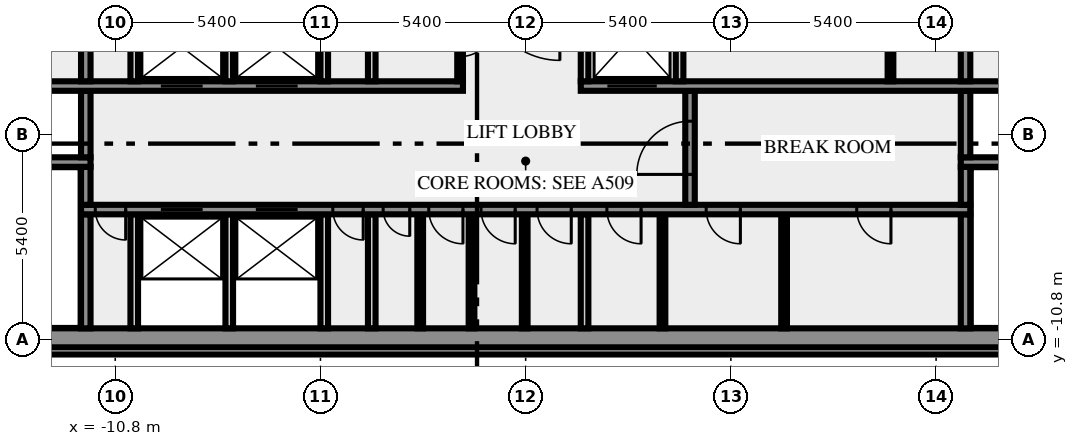
"""IFC4 building model, lengths in metres.
Left out: names, types, materials, properties, quantities, classifications, styles, units other than length and angle.
Written with IfcOpenShell. Run it as: python <this file> out.ifc"""

import sys

from ifc_helpers import new_model, si_unit, direction, frame, frame_2d, origin, place, context, subcontext, project, spatial, rectangle, extrude, element, fill, save


model = new_model("IFC4")
c1 = context("Model", 3, precision=1e-05, world=origin(), true_north=direction((0.0, 1.0)))
c2 = subcontext(c1, "Body", "Model", "MODEL_VIEW")
j1 = project(units=[si_unit("LENGTHUNIT", "METRE"), si_unit("PLANEANGLEUNIT", "RADIAN")], contexts=[c1])
p1 = place(None, origin())
s1 = spatial("IfcSite", under=j1, at=p1, CompositionType="ELEMENT")
p2 = place(p1, origin())
s2 = spatial("IfcBuilding", under=s1, at=p2, CompositionType="ELEMENT")
p3 = place(p2, frame((0.0, 0.0, 269.0)))
s3 = spatial("IfcBuildingStorey", under=s2, at=p3, CompositionType="ELEMENT", Elevation=269.0)
p4 = place(p3, frame((-17.444, -11.088, 0.0), z_axis=(0.0, 0.0, 1.0), x_axis=(1.0, 0.0, 0.0)))
e1 = element("IfcWall", 1, at=p4, inside=s3, PredefinedType="SOLIDWALL", context=c2, shape_type="SweptSolid", body=[
    extrude(rectangle(XDim=34.888, YDim=0.2, at=frame_2d((17.444, 0.0))), origin(), (0.0, 0.0, 1.0), 3.5),
])
p5 = place(p3, frame((-20.0, -10.75, 0.0), z_axis=(0.0, 0.0, 1.0), x_axis=(1.0, 0.0, 0.0)))
e2 = element("IfcWall", 2, at=p5, inside=s3, PredefinedType="SHEAR", context=c2, shape_type="SweptSolid", body=[
    extrude(rectangle(XDim=40.0, YDim=0.5, at=frame_2d((20.0, 0.0))), origin(), (0.0, 0.0, 1.0), 3.5),
])
p6 = place(p5, frame((0.8, 0.0, 1.0)))
e3 = element("IfcOpeningElement", 3, at=p6, cuts=e2, PredefinedType="OPENING", context=c2, shape_type="SweptSolid", body=[
    extrude(rectangle(XDim=1.2, YDim=1.2, at=frame_2d((0.6, 0.6))), frame((0.0, 0.26, 0.0), z_axis=(0.0, -1.0, 0.0), x_axis=(1.0, 0.0, 0.0)), (0.0, 0.0, 1.0), 0.52),
])
p7 = place(p5, frame((38.0, 0.0, 1.0)))
e4 = element("IfcOpeningElement", 4, at=p7, cuts=e2, PredefinedType="OPENING", context=c2, shape_type="SweptSolid", body=[
    extrude(rectangle(XDim=1.2, YDim=1.2, at=frame_2d((0.6, 0.6))), frame((0.0, 0.26, 0.0), z_axis=(0.0, -1.0, 0.0), x_axis=(1.0, 0.0, 0.0)), (0.0, 0.0, 1.0), 0.52),
])
p8 = place(p3, frame((-11.575, -10.5, 0.0), z_axis=(0.0, 0.0, 1.0), x_axis=(0.0, 1.0, 0.0)))
e5 = element("IfcWall", 5, at=p8, inside=s3, PredefinedType="SHEAR", context=c2, shape_type="SweptSolid", body=[
    extrude(rectangle(XDim=3.0, YDim=0.25, at=frame_2d((1.5, 0.0))), origin(), (0.0, 0.0, 1.0), 3.5),
])
for number, where, z_axis, x_axis in (
    (6, (-10.3, -10.5, 0.0), (0.0, 0.0, 1.0), (0.0, 1.0, 0.0)),
    (7, (-7.8, -10.5, 0.0), (0.0, 0.0, 1.0), (0.0, 1.0, 0.0)),
    (8, (-5.3, -10.5, 0.0), (0.0, 0.0, 1.0), (0.0, 1.0, 0.0)),
    (9, (-4.05, -10.5, 0.0), (0.0, 0.0, 1.0), (0.0, 1.0, 0.0)),
):
    element("IfcWall", number, at=place(p3, frame(where, z_axis=z_axis, x_axis=x_axis)), inside=s3, PredefinedType="SOLIDWALL", context=c2, shape_type="SweptSolid", body=[
        extrude(rectangle(XDim=3.0, YDim=0.2, at=frame_2d((1.5, 0.0))), origin(), (0.0, 0.0, 1.0), 3.5),
    ])
for number, where, z_axis, x_axis in (
    (10, (-2.775, -10.5, 0.0), (0.0, 0.0, 1.0), (0.0, 1.0, 0.0)),
    (11, (-1.425, -10.5, 0.0), (0.0, 0.0, 1.0), (0.0, 1.0, 0.0)),
    (12, (-0.025, -10.5, 0.0), (0.0, 0.0, 1.0), (0.0, 1.0, 0.0)),
):
    element("IfcWall", number, at=place(p3, frame(where, z_axis=z_axis, x_axis=x_axis)), inside=s3, PredefinedType="PARTITIONING", context=c2, shape_type="SweptSolid", body=[
        extrude(rectangle(XDim=3.0, YDim=0.15, at=frame_2d((1.5, 0.0))), origin(), (0.0, 0.0, 1.0), 3.5),
    ])
p9 = place(p3, frame((1.55, -10.5, 0.0), z_axis=(0.0, 0.0, 1.0), x_axis=(0.0, 1.0, 0.0)))
e13 = element("IfcWall", 13, at=p9, inside=s3, PredefinedType="SOLIDWALL", context=c2, shape_type="SweptSolid", body=[
    extrude(rectangle(XDim=3.0, YDim=0.2, at=frame_2d((1.5, 0.0))), origin(), (0.0, 0.0, 1.0), 3.5),
])
for number, where, z_axis, x_axis in (
    (14, (3.6, -10.5, 0.0), (0.0, 0.0, 1.0), (0.0, 1.0, 0.0)),
    (15, (6.8, -10.5, 0.0), (0.0, 0.0, 1.0), (0.0, 1.0, 0.0)),
):
    element("IfcWall", number, at=place(p3, frame(where, z_axis=z_axis, x_axis=x_axis)), inside=s3, PredefinedType="PARTITIONING", context=c2, shape_type="SweptSolid", body=[
        extrude(rectangle(XDim=3.0, YDim=0.15, at=frame_2d((1.5, 0.0))), origin(), (0.0, 0.0, 1.0), 3.5),
    ])
p10 = place(p3, frame((11.575, -10.5, 0.0), z_axis=(0.0, 0.0, 1.0), x_axis=(0.0, 1.0, 0.0)))
e16 = element("IfcWall", 16, at=p10, inside=s3, PredefinedType="SHEAR", context=c2, shape_type="SweptSolid", body=[
    extrude(rectangle(XDim=3.0, YDim=0.25, at=frame_2d((1.5, 0.0))), origin(), (0.0, 0.0, 1.0), 3.5),
])
p11 = place(p3, frame((11.7, -7.375, 0.0), z_axis=(0.0, 0.0, 1.0), x_axis=(-1.0, 0.0, 0.0)))
e17 = element("IfcWall", 17, at=p11, inside=s3, PredefinedType="SHEAR", context=c2, shape_type="SweptSolid", body=[
    extrude(rectangle(XDim=23.4, YDim=0.25, at=frame_2d((11.7, 0.0))), origin(), (0.0, 0.0, 1.0), 3.5),
])
p12 = place(p11, frame((22.225, 0.0, 0.0)))
e18 = element("IfcOpeningElement", 18, at=p12, cuts=e17, PredefinedType="OPENING", context=c2, shape_type="SweptSolid", body=[
    extrude(rectangle(XDim=0.8, YDim=2.1, at=frame_2d((0.4, 1.05))), frame((0.0, 0.135, 0.0), z_axis=(0.0, -1.0, 0.0), x_axis=(1.0, 0.0, 0.0)), (0.0, 0.0, 1.0), 0.27),
])
p13 = place(p11, frame((20.2, 0.0, 0.0)))
e19 = element("IfcOpeningElement", 19, at=p13, cuts=e17, PredefinedType="OPENING", context=c2, shape_type="SweptSolid", body=[
    extrude(rectangle(XDim=1.1, YDim=2.1, at=frame_2d((0.55, 1.05))), frame((0.0, 0.135, 0.0), z_axis=(0.0, -1.0, 0.0), x_axis=(1.0, 0.0, 0.0)), (0.0, 0.0, 1.0), 0.27),
])
p14 = place(p11, frame((17.7, 0.0, 0.0)))
e20 = element("IfcOpeningElement", 20, at=p14, cuts=e17, PredefinedType="OPENING", context=c2, shape_type="SweptSolid", body=[
    extrude(rectangle(XDim=1.1, YDim=2.1, at=frame_2d((0.55, 1.05))), frame((0.0, 0.135, 0.0), z_axis=(0.0, -1.0, 0.0), x_axis=(1.0, 0.0, 0.0)), (0.0, 0.0, 1.0), 0.27),
])
p15 = place(p11, frame((15.975, 0.0, 0.0)))
e21 = element("IfcOpeningElement", 21, at=p15, cuts=e17, PredefinedType="OPENING", context=c2, shape_type="SweptSolid", body=[
    extrude(rectangle(XDim=0.8, YDim=2.1, at=frame_2d((0.4, 1.05))), frame((0.0, 0.135, 0.0), z_axis=(0.0, -1.0, 0.0), x_axis=(1.0, 0.0, 0.0)), (0.0, 0.0, 1.0), 0.27),
])
p16 = place(p11, frame((14.75, 0.0, 0.0)))
e22 = element("IfcOpeningElement", 22, at=p16, cuts=e17, PredefinedType="OPENING", context=c2, shape_type="SweptSolid", body=[
    extrude(rectangle(XDim=0.7, YDim=2.1, at=frame_2d((0.35, 1.05))), frame((0.0, 0.135, 0.0), z_axis=(0.0, -1.0, 0.0), x_axis=(1.0, 0.0, 0.0)), (0.0, 0.0, 1.0), 0.27),
])
p17 = place(p11, frame((13.35, 0.0, 0.0)))
e23 = element("IfcOpeningElement", 23, at=p17, cuts=e17, PredefinedType="OPENING", context=c2, shape_type="SweptSolid", body=[
    extrude(rectangle(XDim=0.9, YDim=2.1, at=frame_2d((0.45, 1.05))), frame((0.0, 0.135, 0.0), z_axis=(0.0, -1.0, 0.0), x_axis=(1.0, 0.0, 0.0)), (0.0, 0.0, 1.0), 0.27),
])
p18 = place(p11, frame((11.975, 0.0, 0.0)))
e24 = element("IfcOpeningElement", 24, at=p18, cuts=e17, PredefinedType="OPENING", context=c2, shape_type="SweptSolid", body=[
    extrude(rectangle(XDim=0.9, YDim=2.1, at=frame_2d((0.45, 1.05))), frame((0.0, 0.135, 0.0), z_axis=(0.0, -1.0, 0.0), x_axis=(1.0, 0.0, 0.0)), (0.0, 0.0, 1.0), 0.27),
])
p19 = place(p11, frame((10.5, 0.0, 0.0)))
e25 = element("IfcOpeningElement", 25, at=p19, cuts=e17, PredefinedType="OPENING", context=c2, shape_type="SweptSolid", body=[
    extrude(rectangle(XDim=0.9, YDim=2.1, at=frame_2d((0.45, 1.05))), frame((0.0, 0.135, 0.0), z_axis=(0.0, -1.0, 0.0), x_axis=(1.0, 0.0, 0.0)), (0.0, 0.0, 1.0), 0.27),
])
p20 = place(p11, frame((8.663, 0.0, 0.0)))
e26 = element("IfcOpeningElement", 26, at=p20, cuts=e17, PredefinedType="OPENING", context=c2, shape_type="SweptSolid", body=[
    extrude(rectangle(XDim=0.9, YDim=2.1, at=frame_2d((0.45, 1.05))), frame((0.0, 0.135, 0.0), z_axis=(0.0, -1.0, 0.0), x_axis=(1.0, 0.0, 0.0)), (0.0, 0.0, 1.0), 0.27),
])
p21 = place(p11, frame((6.05, 0.0, 0.0)))
e27 = element("IfcOpeningElement", 27, at=p21, cuts=e17, PredefinedType="OPENING", context=c2, shape_type="SweptSolid", body=[
    extrude(rectangle(XDim=0.9, YDim=2.1, at=frame_2d((0.45, 1.05))), frame((0.0, 0.135, 0.0), z_axis=(0.0, -1.0, 0.0), x_axis=(1.0, 0.0, 0.0)), (0.0, 0.0, 1.0), 0.27),
])
p22 = place(p11, frame((2.088, 0.0, 0.0)))
e28 = element("IfcOpeningElement", 28, at=p22, cuts=e17, PredefinedType="OPENING", context=c2, shape_type="SweptSolid", body=[
    extrude(rectangle(XDim=0.9, YDim=2.1, at=frame_2d((0.45, 1.05))), frame((0.0, 0.135, 0.0), z_axis=(0.0, -1.0, 0.0), x_axis=(1.0, 0.0, 0.0)), (0.0, 0.0, 1.0), 0.27),
])
p23 = place(p3, frame((-11.575, -7.25, 0.0), z_axis=(0.0, 0.0, 1.0), x_axis=(0.0, 1.0, 0.0)))
e29 = element("IfcWall", 29, at=p23, inside=s3, PredefinedType="SHEAR", context=c2, shape_type="SweptSolid", body=[
    extrude(rectangle(XDim=1.0, YDim=0.25, at=frame_2d((0.5, 0.0))), origin(), (0.0, 0.0, 1.0), 3.5),
])
p24 = place(p3, frame((4.325, -7.25, 0.0), z_axis=(0.0, 0.0, 1.0), x_axis=(0.0, 1.0, 0.0)))
e30 = element("IfcWall", 30, at=p24, inside=s3, PredefinedType="SHEAR", context=c2, shape_type="SweptSolid", body=[
    extrude(rectangle(XDim=3.0, YDim=0.25, at=frame_2d((1.5, 0.0))), origin(), (0.0, 0.0, 1.0), 3.5),
])
p25 = place(p24, frame((0.8, 0.0, 0.0)))
e31 = element("IfcOpeningElement", 31, at=p25, cuts=e30, PredefinedType="OPENING", context=c2, shape_type="SweptSolid", body=[
    extrude(rectangle(XDim=1.4, YDim=2.1, at=frame_2d((0.7, 1.05))), frame((0.0, 0.135, 0.0), z_axis=(0.0, -1.0, 0.0), x_axis=(1.0, 0.0, 0.0)), (0.0, 0.0, 1.0), 0.27),
])
p26 = place(p3, frame((11.575, -7.25, 0.0), z_axis=(0.0, 0.0, 1.0), x_axis=(0.0, 1.0, 0.0)))
e32 = element("IfcWall", 32, at=p26, inside=s3, PredefinedType="SHEAR", context=c2, shape_type="SweptSolid", body=[
    extrude(rectangle(XDim=1.0, YDim=0.25, at=frame_2d((0.5, 0.0))), origin(), (0.0, 0.0, 1.0), 3.5),
])
p27 = place(p3, frame((-11.45, -6.125, 0.0), z_axis=(0.0, 0.0, 1.0), x_axis=(-1.0, 0.0, 0.0)))
e33 = element("IfcWall", 33, at=p27, inside=s3, PredefinedType="SHEAR", context=c2, shape_type="SweptSolid", body=[
    extrude(rectangle(XDim=8.05, YDim=0.25, at=frame_2d((4.025, 0.0))), origin(), (0.0, 0.0, 1.0), 3.5),
])
p28 = place(p27, frame((6.2, 0.0, 0.0)))
e34 = element("IfcOpeningElement", 34, at=p28, cuts=e33, PredefinedType="OPENING", context=c2, shape_type="SweptSolid", body=[
    extrude(rectangle(XDim=1.8, YDim=2.1, at=frame_2d((0.9, 1.05))), frame((0.0, 0.135, 0.0), z_axis=(0.0, -1.0, 0.0), x_axis=(1.0, 0.0, 0.0)), (0.0, 0.0, 1.0), 0.27),
])
p29 = place(p3, frame((19.5, -6.125, 0.0), z_axis=(0.0, 0.0, 1.0), x_axis=(-1.0, 0.0, 0.0)))
e35 = element("IfcWall", 35, at=p29, inside=s3, PredefinedType="SHEAR", context=c2, shape_type="SweptSolid", body=[
    extrude(rectangle(XDim=8.05, YDim=0.25, at=frame_2d((4.025, 0.0))), origin(), (0.0, 0.0, 1.0), 3.5),
])
p30 = place(p29, frame((0.05, 0.0, 0.0)))
e36 = element("IfcOpeningElement", 36, at=p30, cuts=e35, PredefinedType="OPENING", context=c2, shape_type="SweptSolid", body=[
    extrude(rectangle(XDim=1.8, YDim=2.1, at=frame_2d((0.9, 1.05))), frame((0.0, 0.135, 0.0), z_axis=(0.0, -1.0, 0.0), x_axis=(1.0, 0.0, 0.0)), (0.0, 0.0, 1.0), 0.27),
])
for number, where, z_axis, x_axis in (
    (37, (-11.575, -6.0, 0.0), (0.0, 0.0, 1.0), (0.0, 1.0, 0.0)),
    (38, (11.575, -6.0, 0.0), (0.0, 0.0, 1.0), (0.0, 1.0, 0.0)),
):
    element("IfcWall", number, at=place(p3, frame(where, z_axis=z_axis, x_axis=x_axis)), inside=s3, PredefinedType="SHEAR", context=c2, shape_type="SweptSolid", body=[
        extrude(rectangle(XDim=1.75, YDim=0.25, at=frame_2d((0.875, 0.0))), origin(), (0.0, 0.0, 1.0), 3.5),
    ])
p31 = place(p3, frame((-14.35, -4.125, 0.0), z_axis=(0.0, 0.0, 1.0), x_axis=(1.0, 0.0, 0.0)))
e39 = element("IfcWall", 39, at=p31, inside=s3, PredefinedType="SHEAR", context=c2, shape_type="SweptSolid", body=[
    extrude(rectangle(XDim=12.7, YDim=0.25, at=frame_2d((6.35, 0.0))), origin(), (0.0, 0.0, 1.0), 3.5),
])
p32 = place(p31, frame((4.75, 0.0, 0.0)))
e40 = element("IfcOpeningElement", 40, at=p32, cuts=e39, PredefinedType="OPENING", context=c2, shape_type="SweptSolid", body=[
    extrude(rectangle(XDim=1.1, YDim=2.1, at=frame_2d((0.55, 1.05))), frame((0.0, 0.135, 0.0), z_axis=(0.0, -1.0, 0.0), x_axis=(1.0, 0.0, 0.0)), (0.0, 0.0, 1.0), 0.27),
])
p33 = place(p31, frame((7.25, 0.0, 0.0)))
e41 = element("IfcOpeningElement", 41, at=p33, cuts=e39, PredefinedType="OPENING", context=c2, shape_type="SweptSolid", body=[
    extrude(rectangle(XDim=1.1, YDim=2.1, at=frame_2d((0.55, 1.05))), frame((0.0, 0.135, 0.0), z_axis=(0.0, -1.0, 0.0), x_axis=(1.0, 0.0, 0.0)), (0.0, 0.0, 1.0), 0.27),
])
p34 = place(p3, frame((1.45, -4.125, 0.0), z_axis=(0.0, 0.0, 1.0), x_axis=(1.0, 0.0, 0.0)))
e42 = element("IfcWall", 42, at=p34, inside=s3, PredefinedType="SHEAR", context=c2, shape_type="SweptSolid", body=[
    extrude(rectangle(XDim=12.9, YDim=0.25, at=frame_2d((6.45, 0.0))), origin(), (0.0, 0.0, 1.0), 3.5),
])
p35 = place(p34, frame((0.7, 0.0, 0.0)))
e43 = element("IfcOpeningElement", 43, at=p35, cuts=e42, PredefinedType="OPENING", context=c2, shape_type="SweptSolid", body=[
    extrude(rectangle(XDim=1.3, YDim=2.1, at=frame_2d((0.65, 1.05))), frame((0.0, 0.135, 0.0), z_axis=(0.0, -1.0, 0.0), x_axis=(1.0, 0.0, 0.0)), (0.0, 0.0, 1.0), 0.27),
])
p36 = place(p3, frame((-11.575, -4.0, 0.0), z_axis=(0.0, 0.0, 1.0), x_axis=(0.0, 1.0, 0.0)))
e44 = element("IfcWall", 44, at=p36, inside=s3, PredefinedType="SHEAR", context=c2, shape_type="SweptSolid", body=[
    extrude(rectangle(XDim=2.3, YDim=0.25, at=frame_2d((1.15, 0.0))), origin(), (0.0, 0.0, 1.0), 3.5),
])
for number, where, z_axis, x_axis in (
    (45, (-10.3, -4.0, 0.0), (0.0, 0.0, 1.0), (0.0, 1.0, 0.0)),
    (46, (-7.8, -4.0, 0.0), (0.0, 0.0, 1.0), (0.0, 1.0, 0.0)),
    (47, (-5.3, -4.0, 0.0), (0.0, 0.0, 1.0), (0.0, 1.0, 0.0)),
    (48, (-4.05, -4.0, 0.0), (0.0, 0.0, 1.0), (0.0, 1.0, 0.0)),
):
    element("IfcWall", number, at=place(p3, frame(where, z_axis=z_axis, x_axis=x_axis)), inside=s3, PredefinedType="SOLIDWALL", context=c2, shape_type="SweptSolid", body=[
        extrude(rectangle(XDim=2.3, YDim=0.2, at=frame_2d((1.15, 0.0))), origin(), (0.0, 0.0, 1.0), 3.5),
    ])
p37 = place(p3, frame((-1.725, -1.7, 0.0), z_axis=(0.0, 0.0, 1.0), x_axis=(0.0, -1.0, 0.0)))
e49 = element("IfcWall", 49, at=p37, inside=s3, PredefinedType="PARTITIONING", context=c2, shape_type="SweptSolid", body=[
    extrude(rectangle(XDim=2.3, YDim=0.15, at=frame_2d((1.15, 0.0))), origin(), (0.0, 0.0, 1.0), 3.5),
])
p38 = place(p37, frame((0.75, 0.0, 0.0)))
e50 = element("IfcOpeningElement", 50, at=p38, cuts=e49, PredefinedType="OPENING", context=c2, shape_type="SweptSolid", body=[
    extrude(rectangle(XDim=0.9, YDim=2.1, at=frame_2d((0.45, 1.05))), frame((0.0, 0.085, 0.0), z_axis=(0.0, -1.0, 0.0), x_axis=(1.0, 0.0, 0.0)), (0.0, 0.0, 1.0), 0.17),
])
for number, where, z_axis, x_axis in (
    (51, (1.55, -4.0, 0.0), (0.0, 0.0, 1.0), (0.0, 1.0, 0.0)),
    (52, (4.05, -4.0, 0.0), (0.0, 0.0, 1.0), (0.0, 1.0, 0.0)),
):
    element("IfcWall", number, at=place(p3, frame(where, z_axis=z_axis, x_axis=x_axis)), inside=s3, PredefinedType="SOLIDWALL", context=c2, shape_type="SweptSolid", body=[
        extrude(rectangle(XDim=2.3, YDim=0.2, at=frame_2d((1.15, 0.0))), origin(), (0.0, 0.0, 1.0), 3.5),
    ])
p39 = place(p3, frame((9.6, -4.0, 0.0), z_axis=(0.0, 0.0, 1.0), x_axis=(0.0, 1.0, 0.0)))
e53 = element("IfcWall", 53, at=p39, inside=s3, PredefinedType="PARTITIONING", context=c2, shape_type="SweptSolid", body=[
    extrude(rectangle(XDim=2.3, YDim=0.15, at=frame_2d((1.15, 0.0))), origin(), (0.0, 0.0, 1.0), 3.5),
])
p40 = place(p3, frame((11.575, -4.0, 0.0), z_axis=(0.0, 0.0, 1.0), x_axis=(0.0, 1.0, 0.0)))
e54 = element("IfcWall", 54, at=p40, inside=s3, PredefinedType="SHEAR", context=c2, shape_type="SweptSolid", body=[
    extrude(rectangle(XDim=2.3, YDim=0.25, at=frame_2d((1.15, 0.0))), origin(), (0.0, 0.0, 1.0), 3.5),
])
p41 = place(p12, origin())
e55 = element("IfcDoor", 55, at=p41, inside=s3, OperationType="SINGLE_SWING_RIGHT", PredefinedType="DOOR", context=c2, shape_type="SweptSolid", body=[
    extrude(rectangle(XDim=0.8, YDim=2.1, at=frame_2d((0.4, 1.05))), frame((0.0, 0.025, 0.0), z_axis=(0.0, -1.0, 0.0), x_axis=(1.0, 0.0, 0.0)), (0.0, 0.0, 1.0), 0.05),
])
fill(e18, e55)
p42 = place(p13, origin())
e56 = element("IfcDoor", 56, at=p42, inside=s3, OperationType="DOUBLE_DOOR_SLIDING", PredefinedType="DOOR", context=c2, shape_type="SweptSolid", body=[
    extrude(rectangle(XDim=1.1, YDim=2.1, at=frame_2d((0.55, 1.05))), frame((0.0, 0.025, 0.0), z_axis=(0.0, -1.0, 0.0), x_axis=(1.0, 0.0, 0.0)), (0.0, 0.0, 1.0), 0.05),
])
fill(e19, e56)
p43 = place(p14, origin())
e57 = element("IfcDoor", 57, at=p43, inside=s3, OperationType="DOUBLE_DOOR_SLIDING", PredefinedType="DOOR", context=c2, shape_type="SweptSolid", body=[
    extrude(rectangle(XDim=1.1, YDim=2.1, at=frame_2d((0.55, 1.05))), frame((0.0, 0.025, 0.0), z_axis=(0.0, -1.0, 0.0), x_axis=(1.0, 0.0, 0.0)), (0.0, 0.0, 1.0), 0.05),
])
fill(e20, e57)
p44 = place(p15, origin())
e58 = element("IfcDoor", 58, at=p44, inside=s3, OperationType="SINGLE_SWING_RIGHT", PredefinedType="DOOR", context=c2, shape_type="SweptSolid", body=[
    extrude(rectangle(XDim=0.8, YDim=2.1, at=frame_2d((0.4, 1.05))), frame((0.0, 0.025, 0.0), z_axis=(0.0, -1.0, 0.0), x_axis=(1.0, 0.0, 0.0)), (0.0, 0.0, 1.0), 0.05),
])
fill(e21, e58)
p45 = place(p16, origin())
e59 = element("IfcDoor", 59, at=p45, inside=s3, OperationType="SINGLE_SWING_RIGHT", PredefinedType="DOOR", context=c2, shape_type="SweptSolid", body=[
    extrude(rectangle(XDim=0.7, YDim=2.1, at=frame_2d((0.35, 1.05))), frame((0.0, 0.025, 0.0), z_axis=(0.0, -1.0, 0.0), x_axis=(1.0, 0.0, 0.0)), (0.0, 0.0, 1.0), 0.05),
])
fill(e22, e59)
p46 = place(p17, origin())
e60 = element("IfcDoor", 60, at=p46, inside=s3, OperationType="SINGLE_SWING_RIGHT", PredefinedType="DOOR", context=c2, shape_type="SweptSolid", body=[
    extrude(rectangle(XDim=0.9, YDim=2.1, at=frame_2d((0.45, 1.05))), frame((0.0, 0.025, 0.0), z_axis=(0.0, -1.0, 0.0), x_axis=(1.0, 0.0, 0.0)), (0.0, 0.0, 1.0), 0.05),
])
fill(e23, e60)
p47 = place(p18, origin())
e61 = element("IfcDoor", 61, at=p47, inside=s3, OperationType="SINGLE_SWING_RIGHT", PredefinedType="DOOR", context=c2, shape_type="SweptSolid", body=[
    extrude(rectangle(XDim=0.9, YDim=2.1, at=frame_2d((0.45, 1.05))), frame((0.0, 0.025, 0.0), z_axis=(0.0, -1.0, 0.0), x_axis=(1.0, 0.0, 0.0)), (0.0, 0.0, 1.0), 0.05),
])
fill(e24, e61)
p48 = place(p19, origin())
e62 = element("IfcDoor", 62, at=p48, inside=s3, OperationType="SINGLE_SWING_LEFT", PredefinedType="DOOR", context=c2, shape_type="SweptSolid", body=[
    extrude(rectangle(XDim=0.9, YDim=2.1, at=frame_2d((0.45, 1.05))), frame((0.0, 0.025, 0.0), z_axis=(0.0, -1.0, 0.0), x_axis=(1.0, 0.0, 0.0)), (0.0, 0.0, 1.0), 0.05),
])
fill(e25, e62)
p49 = place(p20, origin())
e63 = element("IfcDoor", 63, at=p49, inside=s3, OperationType="SINGLE_SWING_LEFT", PredefinedType="DOOR", context=c2, shape_type="SweptSolid", body=[
    extrude(rectangle(XDim=0.9, YDim=2.1, at=frame_2d((0.45, 1.05))), frame((0.0, 0.025, 0.0), z_axis=(0.0, -1.0, 0.0), x_axis=(1.0, 0.0, 0.0)), (0.0, 0.0, 1.0), 0.05),
])
fill(e26, e63)
p50 = place(p21, origin())
e64 = element("IfcDoor", 64, at=p50, inside=s3, OperationType="SINGLE_SWING_LEFT", PredefinedType="DOOR", context=c2, shape_type="SweptSolid", body=[
    extrude(rectangle(XDim=0.9, YDim=2.1, at=frame_2d((0.45, 1.05))), frame((0.0, 0.025, 0.0), z_axis=(0.0, -1.0, 0.0), x_axis=(1.0, 0.0, 0.0)), (0.0, 0.0, 1.0), 0.05),
])
fill(e27, e64)
p51 = place(p22, origin())
e65 = element("IfcDoor", 65, at=p51, inside=s3, OperationType="SINGLE_SWING_LEFT", PredefinedType="DOOR", context=c2, shape_type="SweptSolid", body=[
    extrude(rectangle(XDim=0.9, YDim=2.1, at=frame_2d((0.45, 1.05))), frame((0.0, 0.025, 0.0), z_axis=(0.0, -1.0, 0.0), x_axis=(1.0, 0.0, 0.0)), (0.0, 0.0, 1.0), 0.05),
])
fill(e28, e65)
p52 = place(p25, origin())
e66 = element("IfcDoor", 66, at=p52, inside=s3, OperationType="DOUBLE_DOOR_SINGLE_SWING", PredefinedType="DOOR", context=c2, shape_type="SweptSolid", body=[
    extrude(rectangle(XDim=1.4, YDim=2.1, at=frame_2d((0.7, 1.05))), frame((0.0, 0.025, 0.0), z_axis=(0.0, -1.0, 0.0), x_axis=(1.0, 0.0, 0.0)), (0.0, 0.0, 1.0), 0.05),
])
fill(e31, e66)
p53 = place(p32, origin())
e67 = element("IfcDoor", 67, at=p53, inside=s3, OperationType="DOUBLE_DOOR_SLIDING", PredefinedType="DOOR", context=c2, shape_type="SweptSolid", body=[
    extrude(rectangle(XDim=1.1, YDim=2.1, at=frame_2d((0.55, 1.05))), frame((0.0, 0.025, 0.0), z_axis=(0.0, -1.0, 0.0), x_axis=(1.0, 0.0, 0.0)), (0.0, 0.0, 1.0), 0.05),
])
fill(e40, e67)
p54 = place(p33, origin())
e68 = element("IfcDoor", 68, at=p54, inside=s3, OperationType="DOUBLE_DOOR_SLIDING", PredefinedType="DOOR", context=c2, shape_type="SweptSolid", body=[
    extrude(rectangle(XDim=1.1, YDim=2.1, at=frame_2d((0.55, 1.05))), frame((0.0, 0.025, 0.0), z_axis=(0.0, -1.0, 0.0), x_axis=(1.0, 0.0, 0.0)), (0.0, 0.0, 1.0), 0.05),
])
fill(e41, e68)
p55 = place(p35, origin())
e69 = element("IfcDoor", 69, at=p55, inside=s3, OperationType="DOUBLE_DOOR_SLIDING", PredefinedType="DOOR", context=c2, shape_type="SweptSolid", body=[
    extrude(rectangle(XDim=1.3, YDim=2.1, at=frame_2d((0.65, 1.05))), frame((0.0, 0.025, 0.0), z_axis=(0.0, -1.0, 0.0), x_axis=(1.0, 0.0, 0.0)), (0.0, 0.0, 1.0), 0.05),
])
fill(e43, e69)
p56 = place(p38, origin())
e70 = element("IfcDoor", 70, at=p56, inside=s3, OperationType="SINGLE_SWING_RIGHT", PredefinedType="DOOR", context=c2, shape_type="SweptSolid", body=[
    extrude(rectangle(XDim=0.9, YDim=2.1, at=frame_2d((0.45, 1.05))), frame((0.0, 0.025, 0.0), z_axis=(0.0, -1.0, 0.0), x_axis=(1.0, 0.0, 0.0)), (0.0, 0.0, 1.0), 0.05),
])
fill(e50, e70)
save(model, sys.argv[1])
